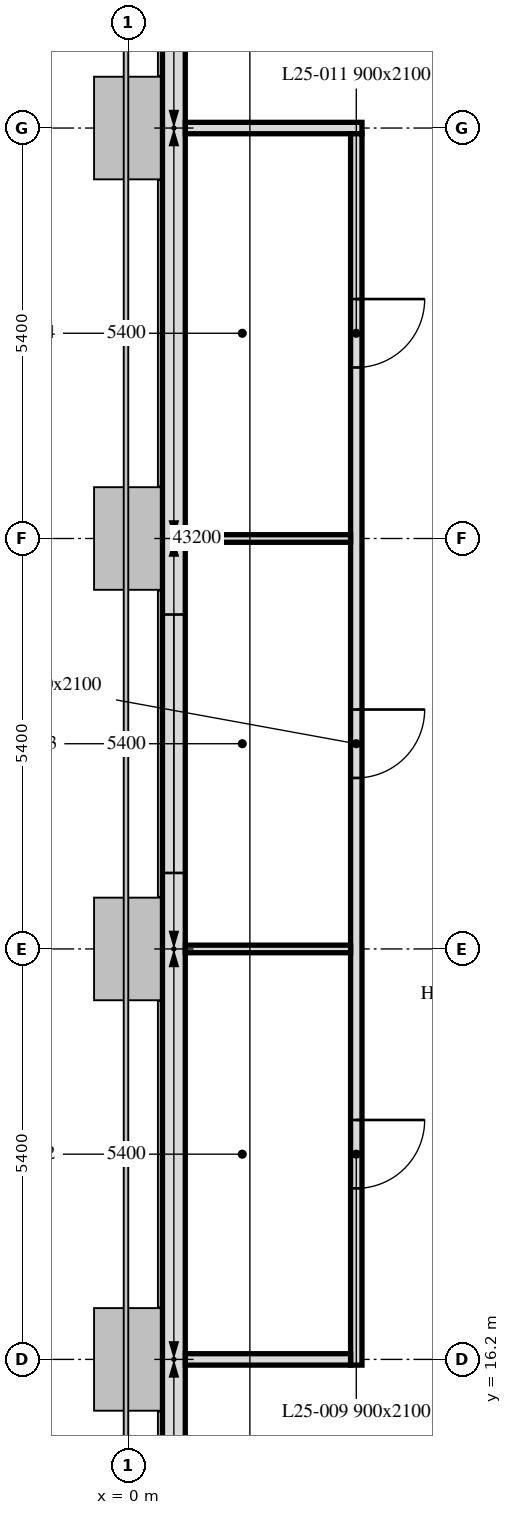
"""IFC4 building model, lengths in metres.
Left out: names, types, materials, properties, quantities, classifications, styles, units other than length and angle.
Written with IfcOpenShell. Run it as: python <this file> out.ifc"""

import sys

from ifc_helpers import new_model, si_unit, direction, frame, frame_2d, origin, place, context, subcontext, project, spatial, rectangle, extrude, element, fill, save


model = new_model("IFC4")
c1 = context("Model", 3, precision=1e-05, world=origin(), true_north=direction((0.0, 1.0)))
c2 = subcontext(c1, "Body", "Model", "MODEL_VIEW")
j1 = project(units=[si_unit("LENGTHUNIT", "METRE"), si_unit("PLANEANGLEUNIT", "RADIAN")], contexts=[c1])
p1 = place(None, origin())
s1 = spatial("IfcSite", under=j1, at=p1, CompositionType="ELEMENT")
p2 = place(p1, origin())
s2 = spatial("IfcBuilding", under=s1, at=p2, CompositionType="ELEMENT")
p3 = place(p2, frame((0.0, 0.0, 106.8)))
s3 = spatial("IfcBuildingStorey", under=s2, at=p3, CompositionType="ELEMENT", Elevation=106.8)
p4 = place(p3, frame((0.6, 43.014, 0.0), z_axis=(0.0, 0.0, 1.0), x_axis=(0.0, -1.0, 0.0)))
e1 = element("IfcWall", 1, at=p4, inside=s3, PredefinedType="SOLIDWALL", context=c2, shape_type="SweptSolid", body=[
    extrude(rectangle(XDim=32.027, YDim=0.3, at=frame_2d((16.014, 0.0))), origin(), (0.0, 0.0, 1.0), 3.5),
])
p5 = place(p4, frame((6.564, 0.0, 0.9)))
e2 = element("IfcOpeningElement", 2, at=p5, cuts=e1, PredefinedType="OPENING", context=c2, shape_type="SweptSolid", body=[
    extrude(rectangle(XDim=1.1, YDim=1.7, at=frame_2d((0.55, 0.85))), frame((0.0, 0.16, 0.0), z_axis=(0.0, -1.0, 0.0), x_axis=(1.0, 0.0, 0.0)), (0.0, 0.0, 1.0), 0.32),
])
p6 = place(p4, frame((8.164, 0.0, 0.9)))
e3 = element("IfcOpeningElement", 3, at=p6, cuts=e1, PredefinedType="OPENING", context=c2, shape_type="SweptSolid", body=[
    extrude(rectangle(XDim=1.1, YDim=1.7, at=frame_2d((0.55, 0.85))), frame((0.0, 0.16, 0.0), z_axis=(0.0, -1.0, 0.0), x_axis=(1.0, 0.0, 0.0)), (0.0, 0.0, 1.0), 0.32),
])
p7 = place(p4, frame((17.014, 0.0, 0.9)))
e4 = element("IfcOpeningElement", 4, at=p7, cuts=e1, PredefinedType="OPENING", context=c2, shape_type="SweptSolid", body=[
    extrude(rectangle(XDim=3.4, YDim=1.7, at=frame_2d((1.7, 0.85))), frame((0.0, 0.16, 0.0), z_axis=(0.0, -1.0, 0.0), x_axis=(1.0, 0.0, 0.0)), (0.0, 0.0, 1.0), 0.32),
])
p8 = place(p4, frame((28.164, 0.0, 0.9)))
e5 = element("IfcOpeningElement", 5, at=p8, cuts=e1, PredefinedType="OPENING", context=c2, shape_type="SweptSolid", body=[
    extrude(rectangle(XDim=1.1, YDim=1.7, at=frame_2d((0.55, 0.85))), frame((0.0, 0.16, 0.0), z_axis=(0.0, -1.0, 0.0), x_axis=(1.0, 0.0, 0.0)), (0.0, 0.0, 1.0), 0.32),
])
p9 = place(p4, frame((29.764, 0.0, 0.9)))
e6 = element("IfcOpeningElement", 6, at=p9, cuts=e1, PredefinedType="OPENING", context=c2, shape_type="SweptSolid", body=[
    extrude(rectangle(XDim=1.1, YDim=1.7, at=frame_2d((0.55, 0.85))), frame((0.0, 0.16, 0.0), z_axis=(0.0, -1.0, 0.0), x_axis=(1.0, 0.0, 0.0)), (0.0, 0.0, 1.0), 0.32),
])
p10 = place(p3, frame((0.751, 32.4, 0.0), z_axis=(0.0, 0.0, 1.0), x_axis=(1.0, 0.0, 0.0)))
e7 = element("IfcWall", 7, at=p10, inside=s3, PredefinedType="PARTITIONING", context=c2, shape_type="SweptSolid", body=[
    extrude(rectangle(XDim=2.324, YDim=0.15, at=frame_2d((1.162, 0.0))), origin(), (0.0, 0.0, 1.0), 2.75),
])
p11 = place(p3, frame((3.0, 32.325, 0.0), z_axis=(0.0, 0.0, 1.0), x_axis=(0.0, -1.0, 0.0)))
e8 = element("IfcWall", 8, at=p11, inside=s3, PredefinedType="PARTITIONING", context=c2, shape_type="SweptSolid", body=[
    extrude(rectangle(XDim=16.2, YDim=0.15, at=frame_2d((8.1, 0.0))), origin(), (0.0, 0.0, 1.0), 2.75),
])
p12 = place(p11, frame((12.975, 0.0, 0.0)))
e9 = element("IfcOpeningElement", 9, at=p12, cuts=e8, PredefinedType="OPENING", context=c2, shape_type="SweptSolid", body=[
    extrude(rectangle(XDim=0.9, YDim=2.1, at=frame_2d((0.45, 1.05))), frame((0.0, 0.075, 0.0), z_axis=(0.0, -1.0, 0.0), x_axis=(1.0, 0.0, 0.0)), (0.0, 0.0, 1.0), 0.15),
])
p13 = place(p11, frame((7.575, 0.0, 0.0)))
e10 = element("IfcOpeningElement", 10, at=p13, cuts=e8, PredefinedType="OPENING", context=c2, shape_type="SweptSolid", body=[
    extrude(rectangle(XDim=0.9, YDim=2.1, at=frame_2d((0.45, 1.05))), frame((0.0, 0.075, 0.0), z_axis=(0.0, -1.0, 0.0), x_axis=(1.0, 0.0, 0.0)), (0.0, 0.0, 1.0), 0.15),
])
p14 = place(p11, frame((2.175, 0.0, 0.0)))
e11 = element("IfcOpeningElement", 11, at=p14, cuts=e8, PredefinedType="OPENING", context=c2, shape_type="SweptSolid", body=[
    extrude(rectangle(XDim=0.9, YDim=2.1, at=frame_2d((0.45, 1.05))), frame((0.0, 0.075, 0.0), z_axis=(0.0, -1.0, 0.0), x_axis=(1.0, 0.0, 0.0)), (0.0, 0.0, 1.0), 0.15),
])
p15 = place(p3, frame((2.925, 16.2, 0.0), z_axis=(0.0, 0.0, 1.0), x_axis=(-1.0, 0.0, 0.0)))
e12 = element("IfcWall", 12, at=p15, inside=s3, PredefinedType="PARTITIONING", context=c2, shape_type="SweptSolid", body=[
    extrude(rectangle(XDim=2.174, YDim=0.15, at=frame_2d((1.087, 0.0))), origin(), (0.0, 0.0, 1.0), 2.75),
])
for number, where, z_axis, x_axis in (
    (13, (2.925, 21.6, 0.0), (0.0, 0.0, 1.0), (-1.0, 0.0, 0.0)),
    (14, (2.925, 27.0, 0.0), (0.0, 0.0, 1.0), (-1.0, 0.0, 0.0)),
):
    element("IfcWall", number, at=place(p3, frame(where, z_axis=z_axis, x_axis=x_axis)), inside=s3, PredefinedType="PARTITIONING", context=c2, shape_type="SweptSolid", body=[
        extrude(rectangle(XDim=2.174, YDim=0.1, at=frame_2d((1.087, 0.0))), origin(), (0.0, 0.0, 1.0), 2.75),
    ])
p16 = place(p7, origin())
e15 = element("IfcWindow", 15, at=p16, inside=s3, PartitioningType="SINGLE_PANEL", PredefinedType="WINDOW", context=c2, shape_type="SweptSolid", body=[
    extrude(rectangle(XDim=3.4, YDim=1.7, at=frame_2d((1.7, 0.85))), frame((0.0, 0.03, 0.0), z_axis=(0.0, -1.0, 0.0), x_axis=(1.0, 0.0, 0.0)), (0.0, 0.0, 1.0), 0.06),
])
fill(e4, e15)
p17 = place(p12, origin())
e16 = element("IfcDoor", 16, at=p17, inside=s3, OperationType="SINGLE_SWING_LEFT", PredefinedType="DOOR", context=c2, shape_type="SweptSolid", body=[
    extrude(rectangle(XDim=0.9, YDim=2.1, at=frame_2d((0.45, 1.05))), frame((0.0, 0.025, 0.0), z_axis=(0.0, -1.0, 0.0), x_axis=(1.0, 0.0, 0.0)), (0.0, 0.0, 1.0), 0.05),
])
fill(e9, e16)
p18 = place(p13, origin())
e17 = element("IfcDoor", 17, at=p18, inside=s3, OperationType="SINGLE_SWING_LEFT", PredefinedType="DOOR", context=c2, shape_type="SweptSolid", body=[
    extrude(rectangle(XDim=0.9, YDim=2.1, at=frame_2d((0.45, 1.05))), frame((0.0, 0.025, 0.0), z_axis=(0.0, -1.0, 0.0), x_axis=(1.0, 0.0, 0.0)), (0.0, 0.0, 1.0), 0.05),
])
fill(e10, e17)
p19 = place(p14, origin())
e18 = element("IfcDoor", 18, at=p19, inside=s3, OperationType="SINGLE_SWING_LEFT", PredefinedType="DOOR", context=c2, shape_type="SweptSolid", body=[
    extrude(rectangle(XDim=0.9, YDim=2.1, at=frame_2d((0.45, 1.05))), frame((0.0, 0.025, 0.0), z_axis=(0.0, -1.0, 0.0), x_axis=(1.0, 0.0, 0.0)), (0.0, 0.0, 1.0), 0.05),
])
fill(e11, e18)
save(model, sys.argv[1])
